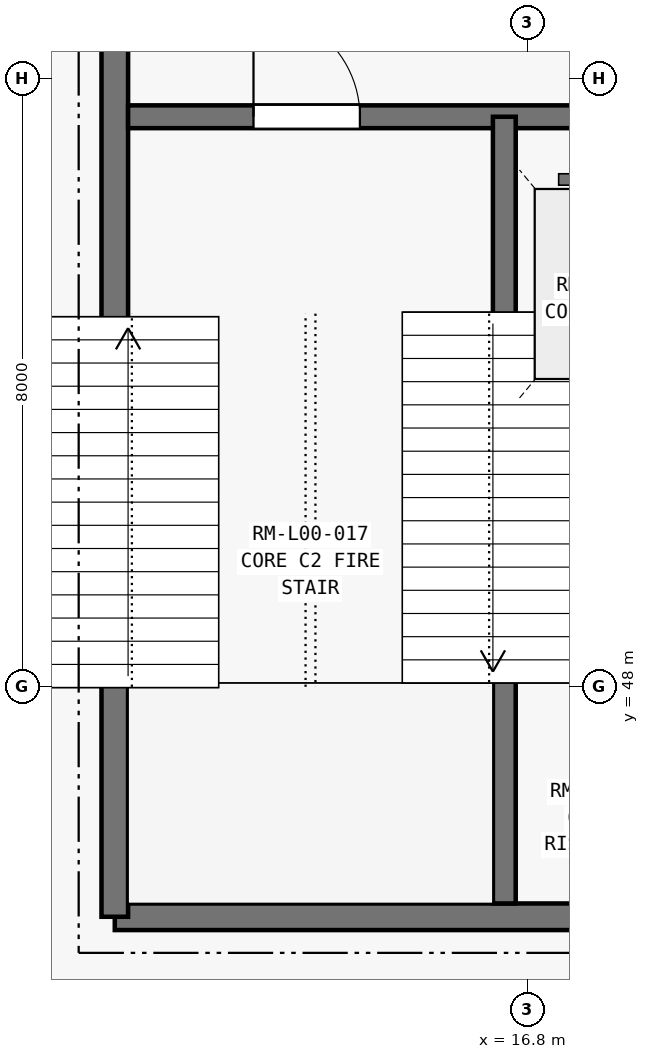
"""IFC4 building model, lengths in metres.
Left out: names, types, materials, properties, quantities, classifications, styles, units other than length and angle.
Written with IfcOpenShell. Run it as: python <this file> out.ifc"""

import sys

from ifc_helpers import new_model, si_unit, direction, frame, frame_2d, origin, place, context, subcontext, project, spatial, rectangle, extrude, element, fill, save


model = new_model("IFC4")
c1 = context("Model", 3, precision=1e-05, world=origin(), true_north=direction((0.0, 1.0)))
c2 = subcontext(c1, "Body", "Model", "MODEL_VIEW")
j1 = project(units=[si_unit("LENGTHUNIT", "METRE"), si_unit("PLANEANGLEUNIT", "RADIAN")], contexts=[c1])
p1 = place(None, origin())
s1 = spatial("IfcSite", under=j1, at=p1, CompositionType="ELEMENT")
p2 = place(p1, origin())
s2 = spatial("IfcBuilding", under=s1, at=p2, CompositionType="ELEMENT")
p3 = place(p2, origin())
s3 = spatial("IfcBuildingStorey", under=s2, at=p3, CompositionType="ELEMENT", Elevation=0.0)
p4 = place(p3, frame((11.375, 44.975, 0.0), z_axis=(0.0, 0.0, 1.0), x_axis=(1.0, 0.0, 0.0)))
e1 = element("IfcWall", 1, at=p4, inside=s3, PredefinedType="SHEAR", context=c2, shape_type="SweptSolid", body=[
    extrude(rectangle(XDim=8.05, YDim=0.35, at=frame_2d((4.025, 0.0))), origin(), (0.0, 0.0, 1.0), 5.4),
])
p5 = place(p3, frame((11.375, 44.975, 0.0), z_axis=(0.0, 0.0, 1.0), x_axis=(0.0, 1.0, 0.0)))
e2 = element("IfcWall", 2, at=p5, inside=s3, PredefinedType="SHEAR", context=c2, shape_type="SweptSolid", body=[
    extrude(rectangle(XDim=14.85, YDim=0.35, at=frame_2d((7.425, 0.0))), origin(), (0.0, 0.0, 1.0), 5.4),
])
p6 = place(p3, frame((11.55, 55.5, 0.0), z_axis=(0.0, 0.0, 1.0), x_axis=(1.0, 0.0, 0.0)))
e3 = element("IfcWall", 3, at=p6, inside=s3, PredefinedType="SHEAR", context=c2, shape_type="SweptSolid", body=[
    extrude(rectangle(XDim=7.7, YDim=0.3, at=frame_2d((3.85, 0.0))), origin(), (0.0, 0.0, 1.0), 5.4),
])
p7 = place(p6, frame((1.65, 0.0, 0.0)))
e4 = element("IfcOpeningElement", 4, at=p7, cuts=e3, PredefinedType="OPENING", context=c2, shape_type="SweptSolid", body=[
    extrude(rectangle(XDim=1.4, YDim=2.2, at=frame_2d((0.7, 1.1))), frame((0.0, 0.16, 0.0), z_axis=(0.0, -1.0, 0.0), x_axis=(1.0, 0.0, 0.0)), (0.0, 0.0, 1.0), 0.32),
])
p8 = place(p6, frame((5.85, 0.0, 0.0)))
e5 = element("IfcOpeningElement", 5, at=p8, cuts=e3, PredefinedType="OPENING", context=c2, shape_type="SweptSolid", body=[
    extrude(rectangle(XDim=1.1, YDim=2.2, at=frame_2d((0.55, 1.1))), frame((0.0, 0.16, 0.0), z_axis=(0.0, -1.0, 0.0), x_axis=(1.0, 0.0, 0.0)), (0.0, 0.0, 1.0), 0.32),
])
p9 = place(p3, frame((16.5, 45.15, 0.0), z_axis=(0.0, 0.0, 1.0), x_axis=(0.0, 1.0, 0.0)))
e6 = element("IfcWall", 6, at=p9, inside=s3, PredefinedType="SHEAR", context=c2, shape_type="SweptSolid", body=[
    extrude(rectangle(XDim=10.35, YDim=0.3, at=frame_2d((5.175, 0.0))), origin(), (0.0, 0.0, 1.0), 5.4),
])
p10 = place(p3, frame((16.65, 51.25, 0.0), z_axis=(0.0, 0.0, 1.0), x_axis=(1.0, 0.0, 0.0)))
e7 = element("IfcWall", 7, at=p10, inside=s3, PredefinedType="SHEAR", context=c2, shape_type="SweptSolid", body=[
    extrude(rectangle(XDim=2.6, YDim=0.3, at=frame_2d((1.3, 0.0))), origin(), (0.0, 0.0, 1.0), 5.4),
])
p11 = place(p3, frame((10.875, 52.4, 0.0), z_axis=(0.0, 0.0, 1.0), x_axis=(-1.0, 0.0, 0.0)))
e8 = element("IfcWall", 8, at=p11, inside=s3, PredefinedType="SOLIDWALL", context=c2, shape_type="SweptSolid", body=[
    extrude(rectangle(XDim=10.165, YDim=0.22, at=frame_2d((5.083, 0.0))), origin(), (0.0, 0.0, 1.0), 5.14),
])
p12 = place(p7, origin())
e9 = element("IfcDoor", 9, at=p12, inside=s3, OperationType="SINGLE_SWING_LEFT", PredefinedType="DOOR", context=c2, shape_type="SweptSolid", body=[
    extrude(rectangle(XDim=1.4, YDim=2.2, at=frame_2d((0.7, 1.1))), frame((0.0, 0.025, 0.0), z_axis=(0.0, -1.0, 0.0), x_axis=(1.0, 0.0, 0.0)), (0.0, 0.0, 1.0), 0.05),
])
fill(e4, e9)
save(model, sys.argv[1])
